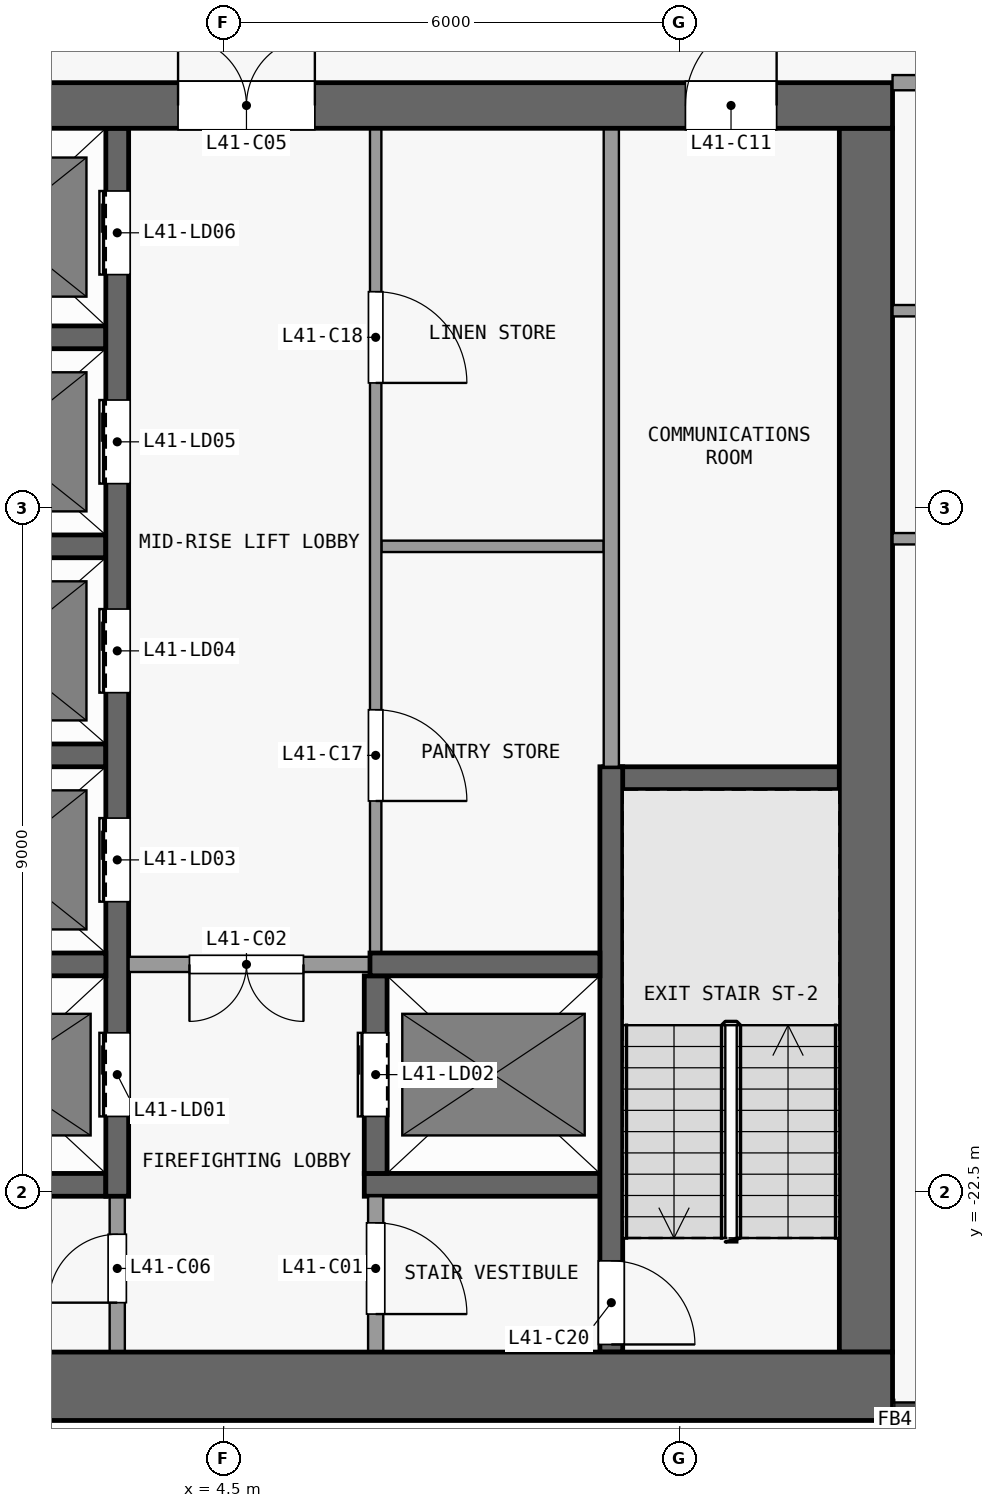
"""IFC4 building model, lengths in metres.
Left out: names, types, materials, properties, quantities, classifications, styles, units other than length and angle.
Written with IfcOpenShell. Run it as: python <this file> out.ifc"""

import sys

from ifc_helpers import new_model, si_unit, direction, frame, frame_2d, origin, place, context, subcontext, project, spatial, rectangle, extrude, element, fill, save


model = new_model("IFC4")
c1 = context("Model", 3, precision=1e-05, world=origin(), true_north=direction((0.0, 1.0)))
c2 = subcontext(c1, "Body", "Model", "MODEL_VIEW")
j1 = project(units=[si_unit("LENGTHUNIT", "METRE"), si_unit("PLANEANGLEUNIT", "RADIAN")], contexts=[c1])
p1 = place(None, origin())
s1 = spatial("IfcSite", under=j1, at=p1, CompositionType="ELEMENT")
p2 = place(p1, origin())
s2 = spatial("IfcBuilding", under=s1, at=p2, CompositionType="ELEMENT")
p3 = place(p2, frame((0.0, 0.0, 167.3)))
s3 = spatial("IfcBuildingStorey", under=s2, at=p3, CompositionType="ELEMENT", Elevation=167.3)
p4 = place(p3, frame((-13.3, -25.05, 0.0), z_axis=(0.0, 0.0, 1.0), x_axis=(1.0, 0.0, 0.0)))
e1 = element("IfcWall", 1, at=p4, inside=s3, PredefinedType="SHEAR", context=c2, shape_type="SweptSolid", body=[
    extrude(rectangle(XDim=26.6, YDim=0.9, at=frame_2d((13.3, 0.0))), origin(), (0.0, 0.0, 1.0), 3.3),
])
p5 = place(p3, frame((-13.3, -8.2, 0.0), z_axis=(0.0, 0.0, 1.0), x_axis=(1.0, 0.0, 0.0)))
e2 = element("IfcWall", 2, at=p5, inside=s3, PredefinedType="SHEAR", context=c2, shape_type="SweptSolid", body=[
    extrude(rectangle(XDim=26.6, YDim=0.6, at=frame_2d((13.3, 0.0))), origin(), (0.0, 0.0, 1.0), 3.3),
])
p6 = place(p5, frame((7.6, 0.0, 0.0)))
e3 = element("IfcOpeningElement", 3, at=p6, cuts=e2, PredefinedType="OPENING", context=c2, shape_type="SweptSolid", body=[
    extrude(rectangle(XDim=1.8, YDim=2.1, at=frame_2d((0.9, 1.05))), frame((0.0, 0.31, 0.0), z_axis=(0.0, -1.0, 0.0), x_axis=(1.0, 0.0, 0.0)), (0.0, 0.0, 1.0), 0.62),
])
p7 = place(p5, frame((17.2, 0.0, 0.0)))
e4 = element("IfcOpeningElement", 4, at=p7, cuts=e2, PredefinedType="OPENING", context=c2, shape_type="SweptSolid", body=[
    extrude(rectangle(XDim=1.8, YDim=2.1, at=frame_2d((0.9, 1.05))), frame((0.0, 0.31, 0.0), z_axis=(0.0, -1.0, 0.0), x_axis=(1.0, 0.0, 0.0)), (0.0, 0.0, 1.0), 0.62),
])
p8 = place(p5, frame((2.525, 0.0, 0.0)))
e5 = element("IfcOpeningElement", 5, at=p8, cuts=e2, PredefinedType="OPENING", context=c2, shape_type="SweptSolid", body=[
    extrude(rectangle(XDim=0.9, YDim=2.1, at=frame_2d((0.45, 1.05))), frame((0.0, 0.31, 0.0), z_axis=(0.0, -1.0, 0.0), x_axis=(1.0, 0.0, 0.0)), (0.0, 0.0, 1.0), 0.62),
])
p9 = place(p5, frame((23.875, 0.0, 0.0)))
e6 = element("IfcOpeningElement", 6, at=p9, cuts=e2, PredefinedType="OPENING", context=c2, shape_type="SweptSolid", body=[
    extrude(rectangle(XDim=1.2, YDim=2.1, at=frame_2d((0.6, 1.05))), frame((0.0, 0.31, 0.0), z_axis=(0.0, -1.0, 0.0), x_axis=(1.0, 0.0, 0.0)), (0.0, 0.0, 1.0), 0.62),
])
p10 = place(p3, frame((12.95, -24.6, 0.0), z_axis=(0.0, 0.0, 1.0), x_axis=(0.0, 1.0, 0.0)))
e7 = element("IfcWall", 7, at=p10, inside=s3, PredefinedType="SHEAR", context=c2, shape_type="SweptSolid", body=[
    extrude(rectangle(XDim=16.1, YDim=0.7, at=frame_2d((8.05, 0.0))), origin(), (0.0, 0.0, 1.0), 3.3),
])
p11 = place(p3, frame((-3.25, -22.4, 0.0), z_axis=(0.0, 0.0, 1.0), x_axis=(1.0, 0.0, 0.0)))
e8 = element("IfcWall", 8, at=p11, inside=s3, PredefinedType="SHEAR", context=c2, shape_type="SweptSolid", body=[
    extrude(rectangle(XDim=6.2, YDim=0.3, at=frame_2d((3.1, 0.0))), origin(), (0.0, 0.0, 1.0), 3.3),
])
p12 = place(p3, frame((6.35, -22.4, 0.0), z_axis=(0.0, 0.0, 1.0), x_axis=(1.0, 0.0, 0.0)))
e9 = element("IfcWall", 9, at=p12, inside=s3, PredefinedType="SHEAR", context=c2, shape_type="SweptSolid", body=[
    extrude(rectangle(XDim=3.1, YDim=0.3, at=frame_2d((1.55, 0.0))), origin(), (0.0, 0.0, 1.0), 3.3),
])
p13 = place(p3, frame((0.15, -19.5, 0.0), z_axis=(0.0, 0.0, 1.0), x_axis=(1.0, 0.0, 0.0)))
e10 = element("IfcWall", 10, at=p13, inside=s3, PredefinedType="SHEAR", context=c2, shape_type="SweptSolid", body=[
    extrude(rectangle(XDim=2.8, YDim=0.3, at=frame_2d((1.4, 0.0))), origin(), (0.0, 0.0, 1.0), 3.3),
])
p14 = place(p3, frame((6.575, -19.5, 0.0), z_axis=(0.0, 0.0, 1.0), x_axis=(-1.0, 0.0, 0.0)))
e11 = element("IfcWall", 11, at=p14, inside=s3, PredefinedType="PARTITIONING", context=c2, shape_type="SweptSolid", body=[
    extrude(rectangle(XDim=3.325, YDim=0.2, at=frame_2d((1.663, 0.0))), origin(), (0.0, 0.0, 1.0), 3.3),
])
p15 = place(p14, frame((1.025, 0.0, 0.0)))
e12 = element("IfcOpeningElement", 12, at=p15, cuts=e11, PredefinedType="OPENING", context=c2, shape_type="SweptSolid", body=[
    extrude(rectangle(XDim=1.5, YDim=2.1, at=frame_2d((0.75, 1.05))), frame((0.0, 0.11, 0.0), z_axis=(0.0, -1.0, 0.0), x_axis=(1.0, 0.0, 0.0)), (0.0, 0.0, 1.0), 0.22),
])
p16 = place(p3, frame((6.425, -19.5, 0.0), z_axis=(0.0, 0.0, 1.0), x_axis=(1.0, 0.0, 0.0)))
e13 = element("IfcWall", 13, at=p16, inside=s3, PredefinedType="SHEAR", context=c2, shape_type="SweptSolid", body=[
    extrude(rectangle(XDim=3.025, YDim=0.3, at=frame_2d((1.512, 0.0))), origin(), (0.0, 0.0, 1.0), 3.3),
])
p17 = place(p3, frame((9.5, -17.05, 0.0), z_axis=(0.0, 0.0, 1.0), x_axis=(1.0, 0.0, 0.0)))
e14 = element("IfcWall", 14, at=p17, inside=s3, PredefinedType="SHEAR", context=c2, shape_type="SweptSolid", body=[
    extrude(rectangle(XDim=3.1, YDim=0.3, at=frame_2d((1.55, 0.0))), origin(), (0.0, 0.0, 1.0), 3.3),
])
for number, where, z_axis, x_axis in (
    (15, (0.15, -16.75, 0.0), (0.0, 0.0, 1.0), (1.0, 0.0, 0.0)),
    (16, (0.15, -14.0, 0.0), (0.0, 0.0, 1.0), (1.0, 0.0, 0.0)),
):
    element("IfcWall", number, at=place(p3, frame(where, z_axis=z_axis, x_axis=x_axis)), inside=s3, PredefinedType="SHEAR", context=c2, shape_type="SweptSolid", body=[
        extrude(rectangle(XDim=2.8, YDim=0.3, at=frame_2d((1.4, 0.0))), origin(), (0.0, 0.0, 1.0), 3.3),
    ])
p18 = place(p3, frame((6.575, -14.0, 0.0), z_axis=(0.0, 0.0, 1.0), x_axis=(1.0, 0.0, 0.0)))
e17 = element("IfcWall", 17, at=p18, inside=s3, PredefinedType="PARTITIONING", context=c2, shape_type="SweptSolid", body=[
    extrude(rectangle(XDim=2.925, YDim=0.15, at=frame_2d((1.462, 0.0))), origin(), (0.0, 0.0, 1.0), 3.3),
])
p19 = place(p3, frame((0.15, -11.25, 0.0), z_axis=(0.0, 0.0, 1.0), x_axis=(1.0, 0.0, 0.0)))
e18 = element("IfcWall", 18, at=p19, inside=s3, PredefinedType="SHEAR", context=c2, shape_type="SweptSolid", body=[
    extrude(rectangle(XDim=2.8, YDim=0.3, at=frame_2d((1.4, 0.0))), origin(), (0.0, 0.0, 1.0), 3.3),
])
p20 = place(p3, frame((3.1, -24.6, 0.0), z_axis=(0.0, 0.0, 1.0), x_axis=(0.0, 1.0, 0.0)))
e19 = element("IfcWall", 19, at=p20, inside=s3, PredefinedType="PARTITIONING", context=c2, shape_type="SweptSolid", body=[
    extrude(rectangle(XDim=2.05, YDim=0.2, at=frame_2d((1.025, 0.0))), origin(), (0.0, 0.0, 1.0), 3.3),
])
p21 = place(p20, frame((0.65, 0.0, 0.0)))
e20 = element("IfcOpeningElement", 20, at=p21, cuts=e19, PredefinedType="OPENING", context=c2, shape_type="SweptSolid", body=[
    extrude(rectangle(XDim=0.9, YDim=2.1, at=frame_2d((0.45, 1.05))), frame((0.0, 0.11, 0.0), z_axis=(0.0, -1.0, 0.0), x_axis=(1.0, 0.0, 0.0)), (0.0, 0.0, 1.0), 0.22),
])
p22 = place(p3, frame((3.1, -22.55, 0.0), z_axis=(0.0, 0.0, 1.0), x_axis=(0.0, 1.0, 0.0)))
e21 = element("IfcWall", 21, at=p22, inside=s3, PredefinedType="SHEAR", context=c2, shape_type="SweptSolid", body=[
    extrude(rectangle(XDim=14.05, YDim=0.3, at=frame_2d((7.025, 0.0))), origin(), (0.0, 0.0, 1.0), 3.3),
])
p23 = place(p22, frame((1.05, 0.0, 0.0)))
e22 = element("IfcOpeningElement", 22, at=p23, cuts=e21, PredefinedType="OPENING", context=c2, shape_type="SweptSolid", body=[
    extrude(rectangle(XDim=1.1, YDim=2.1, at=frame_2d((0.55, 1.05))), frame((0.0, 0.16, 0.0), z_axis=(0.0, -1.0, 0.0), x_axis=(1.0, 0.0, 0.0)), (0.0, 0.0, 1.0), 0.32),
])
p24 = place(p22, frame((3.875, 0.0, 0.0)))
e23 = element("IfcOpeningElement", 23, at=p24, cuts=e21, PredefinedType="OPENING", context=c2, shape_type="SweptSolid", body=[
    extrude(rectangle(XDim=1.1, YDim=2.1, at=frame_2d((0.55, 1.05))), frame((0.0, 0.16, 0.0), z_axis=(0.0, -1.0, 0.0), x_axis=(1.0, 0.0, 0.0)), (0.0, 0.0, 1.0), 0.32),
])
p25 = place(p22, frame((6.625, 0.0, 0.0)))
e24 = element("IfcOpeningElement", 24, at=p25, cuts=e21, PredefinedType="OPENING", context=c2, shape_type="SweptSolid", body=[
    extrude(rectangle(XDim=1.1, YDim=2.1, at=frame_2d((0.55, 1.05))), frame((0.0, 0.16, 0.0), z_axis=(0.0, -1.0, 0.0), x_axis=(1.0, 0.0, 0.0)), (0.0, 0.0, 1.0), 0.32),
])
p26 = place(p22, frame((9.375, 0.0, 0.0)))
e25 = element("IfcOpeningElement", 25, at=p26, cuts=e21, PredefinedType="OPENING", context=c2, shape_type="SweptSolid", body=[
    extrude(rectangle(XDim=1.1, YDim=2.1, at=frame_2d((0.55, 1.05))), frame((0.0, 0.16, 0.0), z_axis=(0.0, -1.0, 0.0), x_axis=(1.0, 0.0, 0.0)), (0.0, 0.0, 1.0), 0.32),
])
p27 = place(p22, frame((12.125, 0.0, 0.0)))
e26 = element("IfcOpeningElement", 26, at=p27, cuts=e21, PredefinedType="OPENING", context=c2, shape_type="SweptSolid", body=[
    extrude(rectangle(XDim=1.1, YDim=2.1, at=frame_2d((0.55, 1.05))), frame((0.0, 0.16, 0.0), z_axis=(0.0, -1.0, 0.0), x_axis=(1.0, 0.0, 0.0)), (0.0, 0.0, 1.0), 0.32),
])
p28 = place(p3, frame((6.5, -22.55, 0.0), z_axis=(0.0, 0.0, 1.0), x_axis=(0.0, -1.0, 0.0)))
e27 = element("IfcWall", 27, at=p28, inside=s3, PredefinedType="PARTITIONING", context=c2, shape_type="SweptSolid", body=[
    extrude(rectangle(XDim=2.05, YDim=0.2, at=frame_2d((1.025, 0.0))), origin(), (0.0, 0.0, 1.0), 3.3),
])
p29 = place(p28, frame((0.35, 0.0, 0.0)))
e28 = element("IfcOpeningElement", 28, at=p29, cuts=e27, PredefinedType="OPENING", context=c2, shape_type="SweptSolid", body=[
    extrude(rectangle(XDim=1.2, YDim=2.1, at=frame_2d((0.6, 1.05))), frame((0.0, 0.11, 0.0), z_axis=(0.0, -1.0, 0.0), x_axis=(1.0, 0.0, 0.0)), (0.0, 0.0, 1.0), 0.22),
])
p30 = place(p3, frame((6.5, -22.25, 0.0), z_axis=(0.0, 0.0, 1.0), x_axis=(0.0, 1.0, 0.0)))
e29 = element("IfcWall", 29, at=p30, inside=s3, PredefinedType="SHEAR", context=c2, shape_type="SweptSolid", body=[
    extrude(rectangle(XDim=2.6, YDim=0.3, at=frame_2d((1.3, 0.0))), origin(), (0.0, 0.0, 1.0), 3.3),
])
p31 = place(p30, frame((0.75, 0.0, 0.0)))
e30 = element("IfcOpeningElement", 30, at=p31, cuts=e29, PredefinedType="OPENING", context=c2, shape_type="SweptSolid", body=[
    extrude(rectangle(XDim=1.1, YDim=2.1, at=frame_2d((0.55, 1.05))), frame((0.0, 0.16, 0.0), z_axis=(0.0, -1.0, 0.0), x_axis=(1.0, 0.0, 0.0)), (0.0, 0.0, 1.0), 0.32),
])
p32 = place(p3, frame((6.5, -8.5, 0.0), z_axis=(0.0, 0.0, 1.0), x_axis=(0.0, -1.0, 0.0)))
e31 = element("IfcWall", 31, at=p32, inside=s3, PredefinedType="PARTITIONING", context=c2, shape_type="SweptSolid", body=[
    extrude(rectangle(XDim=10.85, YDim=0.15, at=frame_2d((5.425, 0.0))), origin(), (0.0, 0.0, 1.0), 3.3),
])
p33 = place(p32, frame((7.65, 0.0, 0.0)))
e32 = element("IfcOpeningElement", 32, at=p33, cuts=e31, PredefinedType="OPENING", context=c2, shape_type="SweptSolid", body=[
    extrude(rectangle(XDim=1.2, YDim=2.1, at=frame_2d((0.6, 1.05))), frame((0.0, 0.085, 0.0), z_axis=(0.0, -1.0, 0.0), x_axis=(1.0, 0.0, 0.0)), (0.0, 0.0, 1.0), 0.17),
])
p34 = place(p32, frame((2.15, 0.0, 0.0)))
e33 = element("IfcOpeningElement", 33, at=p34, cuts=e31, PredefinedType="OPENING", context=c2, shape_type="SweptSolid", body=[
    extrude(rectangle(XDim=1.2, YDim=2.1, at=frame_2d((0.6, 1.05))), frame((0.0, 0.085, 0.0), z_axis=(0.0, -1.0, 0.0), x_axis=(1.0, 0.0, 0.0)), (0.0, 0.0, 1.0), 0.17),
])
p35 = place(p3, frame((9.6, -16.9, 0.0), z_axis=(0.0, 0.0, 1.0), x_axis=(0.0, -1.0, 0.0)))
e34 = element("IfcWall", 34, at=p35, inside=s3, PredefinedType="SHEAR", context=c2, shape_type="SweptSolid", body=[
    extrude(rectangle(XDim=7.7, YDim=0.3, at=frame_2d((3.85, 0.0))), origin(), (0.0, 0.0, 1.0), 3.3),
])
p36 = place(p35, frame((6.5, 0.0, 0.0)))
e35 = element("IfcOpeningElement", 35, at=p36, cuts=e34, PredefinedType="OPENING", context=c2, shape_type="SweptSolid", body=[
    extrude(rectangle(XDim=1.1, YDim=2.1, at=frame_2d((0.55, 1.05))), frame((0.0, 0.16, 0.0), z_axis=(0.0, -1.0, 0.0), x_axis=(1.0, 0.0, 0.0)), (0.0, 0.0, 1.0), 0.32),
])
p37 = place(p3, frame((9.6, -16.9, 0.0), z_axis=(0.0, 0.0, 1.0), x_axis=(0.0, 1.0, 0.0)))
e36 = element("IfcWall", 36, at=p37, inside=s3, PredefinedType="PARTITIONING", context=c2, shape_type="SweptSolid", body=[
    extrude(rectangle(XDim=8.4, YDim=0.2, at=frame_2d((4.2, 0.0))), origin(), (0.0, 0.0, 1.0), 3.3),
])
p38 = place(p3, frame((13.3, -13.9, 0.0), z_axis=(0.0, 0.0, 1.0), x_axis=(1.0, 0.0, 0.0)))
e37 = element("IfcWall", 37, at=p38, inside=s3, PredefinedType="PARTITIONING", context=c2, shape_type="SweptSolid", body=[
    extrude(rectangle(XDim=5.962, YDim=0.15, at=frame_2d((2.981, 0.0))), origin(), (0.0, 0.0, 1.0), 3.3),
])
p39 = place(p38, frame((4.5, 0.0, 0.0)))
e38 = element("IfcOpeningElement", 38, at=p39, cuts=e37, PredefinedType="OPENING", context=c2, shape_type="SweptSolid", body=[
    extrude(rectangle(XDim=0.9, YDim=2.1, at=frame_2d((0.45, 1.05))), frame((0.0, 0.085, 0.0), z_axis=(0.0, -1.0, 0.0), x_axis=(1.0, 0.0, 0.0)), (0.0, 0.0, 1.0), 0.17),
])
p40 = place(p3, frame((13.3, -10.9, 0.0), z_axis=(0.0, 0.0, 1.0), x_axis=(1.0, 0.0, 0.0)))
e39 = element("IfcWall", 39, at=p40, inside=s3, PredefinedType="PARTITIONING", context=c2, shape_type="SweptSolid", body=[
    extrude(rectangle(XDim=6.863, YDim=0.15, at=frame_2d((3.431, 0.0))), origin(), (0.0, 0.0, 1.0), 3.3),
])
p41 = place(p40, frame((1.1, 0.0, 0.0)))
e40 = element("IfcOpeningElement", 40, at=p41, cuts=e39, PredefinedType="OPENING", context=c2, shape_type="SweptSolid", body=[
    extrude(rectangle(XDim=0.9, YDim=2.1, at=frame_2d((0.45, 1.05))), frame((0.0, 0.085, 0.0), z_axis=(0.0, -1.0, 0.0), x_axis=(1.0, 0.0, 0.0)), (0.0, 0.0, 1.0), 0.17),
])
p42 = place(p40, frame((4.5, 0.0, 0.0)))
e41 = element("IfcOpeningElement", 41, at=p42, cuts=e39, PredefinedType="OPENING", context=c2, shape_type="SweptSolid", body=[
    extrude(rectangle(XDim=0.9, YDim=2.1, at=frame_2d((0.45, 1.05))), frame((0.0, 0.085, 0.0), z_axis=(0.0, -1.0, 0.0), x_axis=(1.0, 0.0, 0.0)), (0.0, 0.0, 1.0), 0.17),
])
p43 = place(p3, frame((13.3, -7.9, 0.0), z_axis=(0.0, 0.0, 1.0), x_axis=(1.0, 0.0, 0.0)))
e42 = element("IfcWall", 42, at=p43, inside=s3, PredefinedType="PARTITIONING", context=c2, shape_type="SweptSolid", body=[
    extrude(rectangle(XDim=6.863, YDim=0.2, at=frame_2d((3.431, 0.0))), origin(), (0.0, 0.0, 1.0), 3.3),
])
p44 = place(p43, frame((3.0, 0.0, 0.0)))
e43 = element("IfcOpeningElement", 43, at=p44, cuts=e42, PredefinedType="OPENING", context=c2, shape_type="SweptSolid", body=[
    extrude(rectangle(XDim=1.0, YDim=2.1, at=frame_2d((0.5, 1.05))), frame((0.0, 0.11, 0.0), z_axis=(0.0, -1.0, 0.0), x_axis=(1.0, 0.0, 0.0)), (0.0, 0.0, 1.0), 0.22),
])
p45 = place(p23, origin())
e44 = element("IfcDoor", 44, at=p45, inside=s3, OperationType="DOUBLE_DOOR_SLIDING", PredefinedType="DOOR", context=c2, shape_type="SweptSolid", body=[
    extrude(rectangle(XDim=1.1, YDim=2.1, at=frame_2d((0.55, 1.05))), frame((0.0, 0.025, 0.0), z_axis=(0.0, -1.0, 0.0), x_axis=(1.0, 0.0, 0.0)), (0.0, 0.0, 1.0), 0.05),
])
fill(e22, e44)
p46 = place(p31, origin())
e45 = element("IfcDoor", 45, at=p46, inside=s3, OperationType="DOUBLE_DOOR_SLIDING", PredefinedType="DOOR", context=c2, shape_type="SweptSolid", body=[
    extrude(rectangle(XDim=1.1, YDim=2.1, at=frame_2d((0.55, 1.05))), frame((0.0, 0.025, 0.0), z_axis=(0.0, -1.0, 0.0), x_axis=(1.0, 0.0, 0.0)), (0.0, 0.0, 1.0), 0.05),
])
fill(e30, e45)
p47 = place(p24, origin())
e46 = element("IfcDoor", 46, at=p47, inside=s3, OperationType="DOUBLE_DOOR_SLIDING", PredefinedType="DOOR", context=c2, shape_type="SweptSolid", body=[
    extrude(rectangle(XDim=1.1, YDim=2.1, at=frame_2d((0.55, 1.05))), frame((0.0, 0.025, 0.0), z_axis=(0.0, -1.0, 0.0), x_axis=(1.0, 0.0, 0.0)), (0.0, 0.0, 1.0), 0.05),
])
fill(e23, e46)
p48 = place(p25, origin())
e47 = element("IfcDoor", 47, at=p48, inside=s3, OperationType="DOUBLE_DOOR_SLIDING", PredefinedType="DOOR", context=c2, shape_type="SweptSolid", body=[
    extrude(rectangle(XDim=1.1, YDim=2.1, at=frame_2d((0.55, 1.05))), frame((0.0, 0.025, 0.0), z_axis=(0.0, -1.0, 0.0), x_axis=(1.0, 0.0, 0.0)), (0.0, 0.0, 1.0), 0.05),
])
fill(e24, e47)
p49 = place(p26, origin())
e48 = element("IfcDoor", 48, at=p49, inside=s3, OperationType="DOUBLE_DOOR_SLIDING", PredefinedType="DOOR", context=c2, shape_type="SweptSolid", body=[
    extrude(rectangle(XDim=1.1, YDim=2.1, at=frame_2d((0.55, 1.05))), frame((0.0, 0.025, 0.0), z_axis=(0.0, -1.0, 0.0), x_axis=(1.0, 0.0, 0.0)), (0.0, 0.0, 1.0), 0.05),
])
fill(e25, e48)
p50 = place(p27, origin())
e49 = element("IfcDoor", 49, at=p50, inside=s3, OperationType="DOUBLE_DOOR_SLIDING", PredefinedType="DOOR", context=c2, shape_type="SweptSolid", body=[
    extrude(rectangle(XDim=1.1, YDim=2.1, at=frame_2d((0.55, 1.05))), frame((0.0, 0.025, 0.0), z_axis=(0.0, -1.0, 0.0), x_axis=(1.0, 0.0, 0.0)), (0.0, 0.0, 1.0), 0.05),
])
fill(e26, e49)
p51 = place(p29, origin())
e50 = element("IfcDoor", 50, at=p51, inside=s3, OperationType="SINGLE_SWING_RIGHT", PredefinedType="DOOR", context=c2, shape_type="SweptSolid", body=[
    extrude(rectangle(XDim=1.2, YDim=2.1, at=frame_2d((0.6, 1.05))), frame((0.0, 0.025, 0.0), z_axis=(0.0, -1.0, 0.0), x_axis=(1.0, 0.0, 0.0)), (0.0, 0.0, 1.0), 0.05),
])
fill(e28, e50)
p52 = place(p15, origin())
e51 = element("IfcDoor", 51, at=p52, inside=s3, OperationType="DOUBLE_DOOR_SINGLE_SWING", PredefinedType="DOOR", context=c2, shape_type="SweptSolid", body=[
    extrude(rectangle(XDim=1.5, YDim=2.1, at=frame_2d((0.75, 1.05))), frame((0.0, 0.025, 0.0), z_axis=(0.0, -1.0, 0.0), x_axis=(1.0, 0.0, 0.0)), (0.0, 0.0, 1.0), 0.05),
])
fill(e12, e51)
p53 = place(p7, origin())
e52 = element("IfcDoor", 52, at=p53, inside=s3, OperationType="DOUBLE_DOOR_SINGLE_SWING", PredefinedType="DOOR", context=c2, shape_type="SweptSolid", body=[
    extrude(rectangle(XDim=1.8, YDim=2.1, at=frame_2d((0.9, 1.05))), frame((0.0, 0.025, 0.0), z_axis=(0.0, -1.0, 0.0), x_axis=(1.0, 0.0, 0.0)), (0.0, 0.0, 1.0), 0.05),
])
fill(e4, e52)
p54 = place(p21, origin())
e53 = element("IfcDoor", 53, at=p54, inside=s3, OperationType="SINGLE_SWING_LEFT", PredefinedType="DOOR", context=c2, shape_type="SweptSolid", body=[
    extrude(rectangle(XDim=0.9, YDim=2.1, at=frame_2d((0.45, 1.05))), frame((0.0, 0.025, 0.0), z_axis=(0.0, -1.0, 0.0), x_axis=(1.0, 0.0, 0.0)), (0.0, 0.0, 1.0), 0.05),
])
fill(e20, e53)
p55 = place(p9, origin())
e54 = element("IfcDoor", 54, at=p55, inside=s3, OperationType="SINGLE_SWING_RIGHT", PredefinedType="DOOR", context=c2, shape_type="SweptSolid", body=[
    extrude(rectangle(XDim=1.2, YDim=2.1, at=frame_2d((0.6, 1.05))), frame((0.0, 0.025, 0.0), z_axis=(0.0, -1.0, 0.0), x_axis=(1.0, 0.0, 0.0)), (0.0, 0.0, 1.0), 0.05),
])
fill(e6, e54)
p56 = place(p33, origin())
e55 = element("IfcDoor", 55, at=p56, inside=s3, OperationType="SINGLE_SWING_RIGHT", PredefinedType="DOOR", context=c2, shape_type="SweptSolid", body=[
    extrude(rectangle(XDim=1.2, YDim=2.1, at=frame_2d((0.6, 1.05))), frame((0.0, 0.025, 0.0), z_axis=(0.0, -1.0, 0.0), x_axis=(1.0, 0.0, 0.0)), (0.0, 0.0, 1.0), 0.05),
])
fill(e32, e55)
p57 = place(p34, origin())
e56 = element("IfcDoor", 56, at=p57, inside=s3, OperationType="SINGLE_SWING_RIGHT", PredefinedType="DOOR", context=c2, shape_type="SweptSolid", body=[
    extrude(rectangle(XDim=1.2, YDim=2.1, at=frame_2d((0.6, 1.05))), frame((0.0, 0.025, 0.0), z_axis=(0.0, -1.0, 0.0), x_axis=(1.0, 0.0, 0.0)), (0.0, 0.0, 1.0), 0.05),
])
fill(e33, e56)
p58 = place(p36, origin())
e57 = element("IfcDoor", 57, at=p58, inside=s3, OperationType="SINGLE_SWING_RIGHT", PredefinedType="DOOR", context=c2, shape_type="SweptSolid", body=[
    extrude(rectangle(XDim=1.1, YDim=2.1, at=frame_2d((0.55, 1.05))), frame((0.0, 0.025, 0.0), z_axis=(0.0, -1.0, 0.0), x_axis=(1.0, 0.0, 0.0)), (0.0, 0.0, 1.0), 0.05),
])
fill(e35, e57)
save(model, sys.argv[1])
